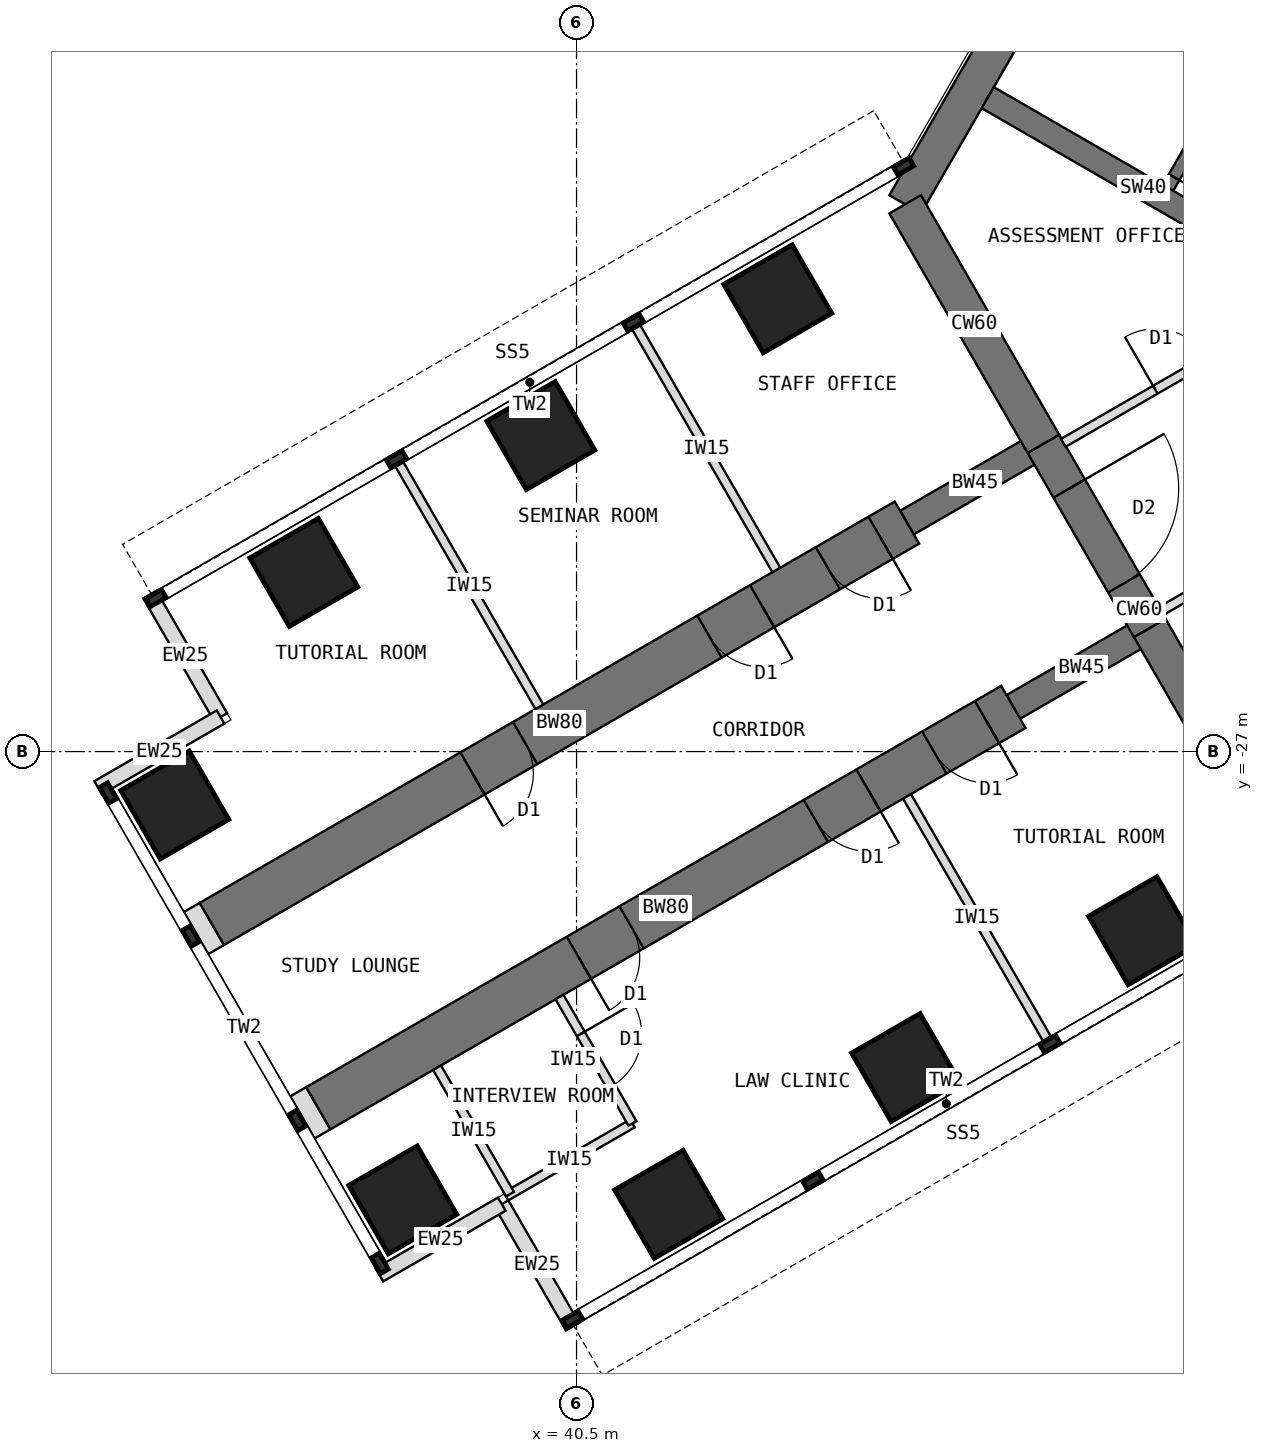
"""IFC4 building model, lengths in metres.
Left out: names, types, materials, properties, quantities, classifications, styles, units other than length and angle.
Written with IfcOpenShell. Run it as: python <this file> out.ifc"""

import sys

from ifc_helpers import new_model, si_unit, direction, frame, frame_2d, origin, origin_2d, place, context, subcontext, project, spatial, rectangle, extrude, element, fill, save


model = new_model("IFC4")
c1 = context("Model", 3, precision=1e-05, world=origin(), true_north=direction((0.0, 1.0)))
c2 = subcontext(c1, "Body", "Model", "MODEL_VIEW")
j1 = project(units=[si_unit("LENGTHUNIT", "METRE"), si_unit("PLANEANGLEUNIT", "RADIAN")], contexts=[c1])
p1 = place(None, origin())
s1 = spatial("IfcSite", under=j1, at=p1, CompositionType="ELEMENT")
p2 = place(p1, origin())
s2 = spatial("IfcBuilding", under=s1, at=p2, CompositionType="ELEMENT")
p3 = place(p2, frame((0.0, 0.0, 125.5)))
s3 = spatial("IfcBuildingStorey", under=s2, at=p3, CompositionType="ELEMENT", Elevation=125.5)
p4 = place(p3, frame((52.202, -7.092, 0.0), z_axis=(0.0, 0.0, 1.0), x_axis=(-0.500005998175, -0.866021940709, 0.0)))
e1 = element("IfcWall", 1, at=p4, inside=s3, PredefinedType="SHEAR", context=c2, shape_type="SweptSolid", body=[
    extrude(rectangle(XDim=12.596, YDim=0.6, at=frame_2d((6.298, 0.0))), origin(), (0.0, 0.0, 1.0), 4.0),
])
p5 = place(p3, frame((45.904, -18.0, 0.0), z_axis=(0.0, 0.0, 1.0), x_axis=(0.500024481964, -0.866011268655, 0.0)))
e2 = element("IfcWall", 2, at=p5, inside=s3, PredefinedType="SHEAR", context=c2, shape_type="SweptSolid", body=[
    extrude(rectangle(XDim=4.548, YDim=0.6, at=frame_2d((2.274, 0.0))), origin(), (0.0, 0.0, 1.0), 4.0),
])
p6 = place(p3, frame((48.178, -21.939, 0.0), z_axis=(0.0, 0.0, 1.0), x_axis=(0.500010275428, -0.866019471182, 0.0)))
e3 = element("IfcWall", 3, at=p6, inside=s3, PredefinedType="SHEAR", context=c2, shape_type="SweptSolid", body=[
    extrude(rectangle(XDim=3.5, YDim=0.6, at=frame_2d((1.75, 0.0))), origin(), (0.0, 0.0, 1.0), 4.0),
])
p7 = place(p6, frame((0.85, 0.0, 0.0)))
e4 = element("IfcOpeningElement", 4, at=p7, cuts=e3, PredefinedType="OPENING", context=c2, shape_type="SweptSolid", body=[
    extrude(rectangle(XDim=1.8, YDim=2.1, at=frame_2d((0.9, 1.05))), frame((0.0, 0.31, 0.0), z_axis=(0.0, -1.0, 0.0), x_axis=(1.0, 0.0, 0.0)), (0.0, 0.0, 1.0), 0.62),
])
p8 = place(p3, frame((49.928, -24.97, 0.0), z_axis=(0.0, 0.0, 1.0), x_axis=(0.499984222037, -0.866034513004, 0.0)))
e5 = element("IfcWall", 5, at=p8, inside=s3, PredefinedType="SHEAR", context=c2, shape_type="SweptSolid", body=[
    extrude(rectangle(XDim=4.548, YDim=0.6, at=frame_2d((2.274, 0.0))), origin(), (0.0, 0.0, 1.0), 4.0),
])
p9 = place(p3, frame((49.928, -24.97, 0.0), z_axis=(0.0, 0.0, 1.0), x_axis=(-0.866031863473, -0.499988811324, 0.0)))
e6 = element("IfcWall", 6, at=p9, inside=s3, PredefinedType="SHEAR", context=c2, shape_type="SweptSolid", body=[
    extrude(rectangle(XDim=2.592, YDim=0.45, at=frame_2d((1.296, 0.0))), origin(), (0.0, 0.0, 1.0), 4.0),
])
p10 = place(p3, frame((47.684, -26.266, 0.0), z_axis=(0.0, 0.0, 1.0), x_axis=(-0.866027579429, -0.499996231654, 0.0)))
e7 = element("IfcWall", 7, at=p10, inside=s3, PredefinedType="SHEAR", context=c2, shape_type="SweptSolid", body=[
    extrude(rectangle(XDim=13.2, YDim=0.8, at=frame_2d((6.6, 0.0))), origin(), (0.0, 0.0, 1.0), 4.0),
])
p11 = place(p10, frame((0.5, 0.0, 0.0)))
e8 = element("IfcOpeningElement", 8, at=p11, cuts=e7, PredefinedType="OPENING", context=c2, shape_type="SweptSolid", body=[
    extrude(rectangle(XDim=1.0, YDim=2.1, at=frame_2d((0.5, 1.05))), frame((0.0, 0.41, 0.0), z_axis=(0.0, -1.0, 0.0), x_axis=(1.0, 0.0, 0.0)), (0.0, 0.0, 1.0), 0.82),
])
p12 = place(p10, frame((2.75, 0.0, 0.0)))
e9 = element("IfcOpeningElement", 9, at=p12, cuts=e7, PredefinedType="OPENING", context=c2, shape_type="SweptSolid", body=[
    extrude(rectangle(XDim=1.0, YDim=2.1, at=frame_2d((0.5, 1.05))), frame((0.0, 0.41, 0.0), z_axis=(0.0, -1.0, 0.0), x_axis=(1.0, 0.0, 0.0)), (0.0, 0.0, 1.0), 0.82),
])
p13 = place(p10, frame((7.25, 0.0, 0.0)))
e10 = element("IfcOpeningElement", 10, at=p13, cuts=e7, PredefinedType="OPENING", context=c2, shape_type="SweptSolid", body=[
    extrude(rectangle(XDim=1.0, YDim=2.1, at=frame_2d((0.5, 1.05))), frame((0.0, 0.41, 0.0), z_axis=(0.0, -1.0, 0.0), x_axis=(1.0, 0.0, 0.0)), (0.0, 0.0, 1.0), 0.82),
])
p14 = place(p3, frame((48.178, -21.939, 0.0), z_axis=(0.0, 0.0, 1.0), x_axis=(-0.866072649678, -0.499918158782, 0.0)))
e11 = element("IfcWall", 11, at=p14, inside=s3, PredefinedType="SHEAR", context=c2, shape_type="SweptSolid", body=[
    extrude(rectangle(XDim=2.592, YDim=0.45, at=frame_2d((1.296, 0.0))), origin(), (0.0, 0.0, 1.0), 4.0),
])
p15 = place(p3, frame((45.934, -23.234, 0.0), z_axis=(0.0, 0.0, 1.0), x_axis=(-0.866019570528, -0.500010103361, 0.0)))
e12 = element("IfcWall", 12, at=p15, inside=s3, PredefinedType="SHEAR", context=c2, shape_type="SweptSolid", body=[
    extrude(rectangle(XDim=13.2, YDim=0.8, at=frame_2d((6.6, 0.0))), origin(), (0.0, 0.0, 1.0), 4.0),
])
p16 = place(p15, frame((0.5, 0.0, 0.0)))
e13 = element("IfcOpeningElement", 13, at=p16, cuts=e12, PredefinedType="OPENING", context=c2, shape_type="SweptSolid", body=[
    extrude(rectangle(XDim=1.0, YDim=2.1, at=frame_2d((0.5, 1.05))), frame((0.0, 0.41, 0.0), z_axis=(0.0, -1.0, 0.0), x_axis=(1.0, 0.0, 0.0)), (0.0, 0.0, 1.0), 0.82),
])
p17 = place(p15, frame((2.75, 0.0, 0.0)))
e14 = element("IfcOpeningElement", 14, at=p17, cuts=e12, PredefinedType="OPENING", context=c2, shape_type="SweptSolid", body=[
    extrude(rectangle(XDim=1.0, YDim=2.1, at=frame_2d((0.5, 1.05))), frame((0.0, 0.41, 0.0), z_axis=(0.0, -1.0, 0.0), x_axis=(1.0, 0.0, 0.0)), (0.0, 0.0, 1.0), 0.82),
])
p18 = place(p15, frame((7.25, 0.0, 0.0)))
e15 = element("IfcOpeningElement", 15, at=p18, cuts=e12, PredefinedType="OPENING", context=c2, shape_type="SweptSolid", body=[
    extrude(rectangle(XDim=1.0, YDim=2.1, at=frame_2d((0.5, 1.05))), frame((0.0, 0.41, 0.0), z_axis=(0.0, -1.0, 0.0), x_axis=(1.0, 0.0, 0.0)), (0.0, 0.0, 1.0), 0.82),
])
for number, where, z_axis, x_axis in (
    (16, (49.809, -29.946, 0.0), (0.0, 0.0, 1.0), (0.866, 0.5, 0.0)),
    (17, (43.809, -19.554, 0.0), (0.0, 0.0, 1.0), (0.866, 0.5, 0.0)),
    (18, (45.912, -32.196, 0.0), (0.0, 0.0, 1.0), (0.866, 0.5, 0.0)),
    (19, (39.912, -21.804, 0.0), (0.0, 0.0, 1.0), (0.866, 0.5, 0.0)),
    (20, (42.014, -34.446, 0.0), (0.0, 0.0, 1.0), (0.866, 0.5, 0.0)),
    (21, (36.014, -24.054, 0.0), (0.0, 0.0, 1.0), (0.866, 0.5, 0.0)),
    (22, (37.642, -34.373, 0.0), (0.0, 0.0, 1.0), (0.866, 0.5, 0.0)),
    (23, (33.892, -27.877, 0.0), (0.0, 0.0, 1.0), (0.866, 0.5, 0.0)),
):
    element("IfcColumn", number, at=place(p3, frame(where, z_axis=z_axis, x_axis=x_axis)), inside=s3, PredefinedType="COLUMN", context=c2, shape_type="SweptSolid", body=[
        extrude(rectangle(XDim=1.3, YDim=1.3, at=origin_2d()), origin(), (0.0, 0.0, 1.0), 4.0),
    ])
for number, where, z_axis, x_axis in (
    (24, (40.433, -36.456, 0.0), (0.0, 0.0, 1.0), (-0.5, 0.866, 0.0)),
    (25, (39.27, -34.443, 0.0), (0.0, 0.0, 1.0), (-0.866, -0.5, 0.0)),
    (26, (33.483, -24.419, 0.0), (0.0, 0.0, 1.0), (0.5, -0.866, 0.0)),
    (27, (34.645, -26.432, 0.0), (0.0, 0.0, 1.0), (-0.866, -0.5, 0.0)),
):
    element("IfcWall", number, at=place(p3, frame(where, z_axis=z_axis, x_axis=x_axis)), inside=s3, PredefinedType="STANDARD", context=c2, shape_type="SweptSolid", body=[
        extrude(rectangle(XDim=2.325, YDim=0.25, at=frame_2d((1.163, 0.0))), origin(), (0.0, 0.0, 1.0), 3.8),
    ])
p19 = place(p3, frame((36.252, -32.865, 0.0), z_axis=(0.0, 0.0, 1.0), x_axis=(-0.865778900179, -0.500426713919, 0.0)))
e28 = element("IfcWall", 28, at=p19, inside=s3, PredefinedType="PARTITIONING", context=c2, shape_type="SweptSolid", body=[
    extrude(rectangle(XDim=0.3, YDim=0.8, at=frame_2d((0.15, 0.0))), origin(), (0.0, 0.0, 1.0), 3.8),
])
p20 = place(p3, frame((34.502, -29.834, 0.0), z_axis=(0.0, 0.0, 1.0), x_axis=(-0.866131372301, -0.499816412211, 0.0)))
e29 = element("IfcWall", 29, at=p20, inside=s3, PredefinedType="PARTITIONING", context=c2, shape_type="SweptSolid", body=[
    extrude(rectangle(XDim=0.3, YDim=0.8, at=frame_2d((0.15, 0.0))), origin(), (0.0, 0.0, 1.0), 3.8),
])
p21 = place(p3, frame((54.178, -10.886, 0.0), z_axis=(0.0, 0.0, 1.0), x_axis=(-0.49999894854, -0.866026010844, 0.0)))
e30 = element("IfcWall", 30, at=p21, inside=s3, PredefinedType="SHEAR", context=c2, shape_type="SweptSolid", body=[
    extrude(rectangle(XDim=8.0, YDim=0.2, at=frame_2d((4.0, 0.0))), origin(), (0.0, 0.0, 1.0), 4.0),
])
p22 = place(p21, frame((6.8, 0.0, 0.0)))
e31 = element("IfcOpeningElement", 31, at=p22, cuts=e30, PredefinedType="OPENING", context=c2, shape_type="SweptSolid", body=[
    extrude(rectangle(XDim=0.9, YDim=2.1, at=frame_2d((0.45, 1.05))), frame((0.0, 0.11, 0.0), z_axis=(0.0, -1.0, 0.0), x_axis=(1.0, 0.0, 0.0)), (0.0, 0.0, 1.0), 0.22),
])
p23 = place(p3, frame((52.38, -19.201, 0.0), z_axis=(0.0, 0.0, 1.0), x_axis=(-0.866027317282, 0.49999668571, 0.0)))
e32 = element("IfcWall", 32, at=p23, inside=s3, PredefinedType="SHEAR", context=c2, shape_type="SweptSolid", body=[
    extrude(rectangle(XDim=5.908, YDim=0.4, at=frame_2d((2.954, 0.0))), origin(), (0.0, 0.0, 1.0), 4.0),
])
p24 = place(p3, frame((45.935, -27.737, 0.0), z_axis=(0.0, 0.0, 1.0), x_axis=(0.500014953309, -0.866016770315, 0.0)))
e33 = element("IfcWall", 33, at=p24, inside=s3, PredefinedType="PARTITIONING", context=c2, shape_type="SweptSolid", body=[
    extrude(rectangle(XDim=4.6, YDim=0.15, at=frame_2d((2.3, 0.0))), origin(), (0.0, 0.0, 1.0), 3.8),
])
p25 = place(p3, frame((41.419, -33.115, 0.0), z_axis=(0.0, 0.0, 1.0), x_axis=(-0.866050077142, -0.499957262057, 0.0)))
e34 = element("IfcWall", 34, at=p25, inside=s3, PredefinedType="PARTITIONING", context=c2, shape_type="SweptSolid", body=[
    extrude(rectangle(XDim=2.4, YDim=0.15, at=frame_2d((1.2, 0.0))), origin(), (0.0, 0.0, 1.0), 3.8),
])
p26 = place(p3, frame((40.219, -31.037, 0.0), z_axis=(0.0, 0.0, 1.0), x_axis=(0.500033551112, -0.866006032174, 0.0)))
e35 = element("IfcWall", 35, at=p26, inside=s3, PredefinedType="PARTITIONING", context=c2, shape_type="SweptSolid", body=[
    extrude(rectangle(XDim=2.4, YDim=0.15, at=frame_2d((1.2, 0.0))), origin(), (0.0, 0.0, 1.0), 3.8),
])
p27 = place(p26, frame((0.7, 0.0, 0.0)))
e36 = element("IfcOpeningElement", 36, at=p27, cuts=e35, PredefinedType="OPENING", context=c2, shape_type="SweptSolid", body=[
    extrude(rectangle(XDim=1.0, YDim=2.1, at=frame_2d((0.5, 1.05))), frame((0.0, 0.085, 0.0), z_axis=(0.0, -1.0, 0.0), x_axis=(1.0, 0.0, 0.0)), (0.0, 0.0, 1.0), 0.17),
])
p28 = place(p3, frame((38.206, -32.199, 0.0), z_axis=(0.0, 0.0, 1.0), x_axis=(0.500001309137, -0.866024647952, 0.0)))
e37 = element("IfcWall", 37, at=p28, inside=s3, PredefinedType="PARTITIONING", context=c2, shape_type="SweptSolid", body=[
    extrude(rectangle(XDim=2.4, YDim=0.15, at=frame_2d((1.2, 0.0))), origin(), (0.0, 0.0, 1.0), 3.8),
])
for number, where, z_axis, x_axis in (
    (38, (43.785, -24.013, 0.0), (0.0, 0.0, 1.0), (-0.5, 0.866, 0.0)),
    (39, (39.888, -26.263, 0.0), (0.0, 0.0, 1.0), (-0.5, 0.866, 0.0)),
):
    element("IfcWall", number, at=place(p3, frame(where, z_axis=z_axis, x_axis=x_axis)), inside=s3, PredefinedType="PARTITIONING", context=c2, shape_type="SweptSolid", body=[
        extrude(rectangle(XDim=4.6, YDim=0.15, at=frame_2d((2.3, 0.0))), origin(), (0.0, 0.0, 1.0), 3.8),
    ])
p29 = place(p3, frame((54.017, -22.436, 0.0), z_axis=(0.0, 0.0, 1.0), x_axis=(-0.86602002524, -0.500009315796, 0.0)))
e40 = element("IfcWall", 40, at=p29, inside=s3, PredefinedType="PARTITIONING", context=c2, shape_type="SweptSolid", body=[
    extrude(rectangle(XDim=4.519, YDim=0.15, at=frame_2d((2.259, 0.0))), origin(), (0.0, 0.0, 1.0), 3.8),
])
p30 = place(p29, frame((1.769, 0.0, 0.0)))
e41 = element("IfcOpeningElement", 41, at=p30, cuts=e40, PredefinedType="OPENING", context=c2, shape_type="SweptSolid", body=[
    extrude(rectangle(XDim=1.0, YDim=2.1, at=frame_2d((0.5, 1.05))), frame((0.0, 0.085, 0.0), z_axis=(0.0, -1.0, 0.0), x_axis=(1.0, 0.0, 0.0)), (0.0, 0.0, 1.0), 0.17),
])
p31 = place(p3, frame((48.504, -21.924, 0.0), z_axis=(0.0, 0.0, 1.0), x_axis=(0.866006515865, 0.500032713409, 0.0)))
e42 = element("IfcWall", 42, at=p31, inside=s3, PredefinedType="PARTITIONING", context=c2, shape_type="SweptSolid", body=[
    extrude(rectangle(XDim=4.518, YDim=0.15, at=frame_2d((2.259, 0.0))), origin(), (0.0, 0.0, 1.0), 3.8),
])
p32 = place(p31, frame((1.749, 0.0, 0.0)))
e43 = element("IfcOpeningElement", 43, at=p32, cuts=e42, PredefinedType="OPENING", context=c2, shape_type="SweptSolid", body=[
    extrude(rectangle(XDim=1.0, YDim=2.1, at=frame_2d((0.5, 1.05))), frame((0.0, 0.085, 0.0), z_axis=(0.0, -1.0, 0.0), x_axis=(1.0, 0.0, 0.0)), (0.0, 0.0, 1.0), 0.17),
])
p33 = place(p22, origin())
e44 = element("IfcDoor", 44, at=p33, inside=s3, OperationType="SINGLE_SWING_RIGHT", PredefinedType="DOOR", context=c2, shape_type="SweptSolid", body=[
    extrude(rectangle(XDim=0.9, YDim=2.1, at=frame_2d((0.45, 1.05))), frame((0.0, 0.025, 0.0), z_axis=(0.0, -1.0, 0.0), x_axis=(1.0, 0.0, 0.0)), (0.0, 0.0, 1.0), 0.05),
])
fill(e31, e44)
p34 = place(p7, origin())
e45 = element("IfcDoor", 45, at=p34, inside=s3, OperationType="DOUBLE_DOOR_DOUBLE_SWING", PredefinedType="DOOR", context=c2, shape_type="SweptSolid", body=[
    extrude(rectangle(XDim=1.72, YDim=2.06, at=frame_2d((0.9, 1.03))), frame((0.0, 0.025, 0.0), z_axis=(0.0, -1.0, 0.0), x_axis=(1.0, 0.0, 0.0)), (0.0, 0.0, 1.0), 0.05),
    extrude(rectangle(XDim=0.04, YDim=2.1, at=frame_2d((0.02, 1.05))), frame((0.0, 0.3, 0.0), z_axis=(0.0, -1.0, 0.0), x_axis=(1.0, 0.0, 0.0)), (0.0, 0.0, 1.0), 0.6),
    extrude(rectangle(XDim=0.04, YDim=2.1, at=frame_2d((1.78, 1.05))), frame((0.0, 0.3, 0.0), z_axis=(0.0, -1.0, 0.0), x_axis=(1.0, 0.0, 0.0)), (0.0, 0.0, 1.0), 0.6),
    extrude(rectangle(XDim=1.72, YDim=0.04, at=frame_2d((0.9, 2.08))), frame((0.0, 0.3, 0.0), z_axis=(0.0, -1.0, 0.0), x_axis=(1.0, 0.0, 0.0)), (0.0, 0.0, 1.0), 0.6),
])
fill(e4, e45)
p35 = place(p27, origin())
e46 = element("IfcDoor", 46, at=p35, inside=s3, OperationType="SINGLE_SWING_LEFT", PredefinedType="DOOR", context=c2, shape_type="SweptSolid", body=[
    extrude(rectangle(XDim=1.0, YDim=2.1, at=frame_2d((0.5, 1.05))), frame((0.0, 0.025, 0.0), z_axis=(0.0, -1.0, 0.0), x_axis=(1.0, 0.0, 0.0)), (0.0, 0.0, 1.0), 0.05),
])
fill(e36, e46)
p36 = place(p32, origin())
e47 = element("IfcDoor", 47, at=p36, inside=s3, OperationType="SINGLE_SWING_LEFT", PredefinedType="DOOR", context=c2, shape_type="SweptSolid", body=[
    extrude(rectangle(XDim=1.0, YDim=2.1, at=frame_2d((0.5, 1.05))), frame((0.0, 0.025, 0.0), z_axis=(0.0, -1.0, 0.0), x_axis=(1.0, 0.0, 0.0)), (0.0, 0.0, 1.0), 0.05),
])
fill(e43, e47)
p37 = place(p11, origin())
e48 = element("IfcDoor", 48, at=p37, inside=s3, OperationType="SINGLE_SWING_LEFT", PredefinedType="DOOR", context=c2, shape_type="SweptSolid", body=[
    extrude(rectangle(XDim=0.92, YDim=2.06, at=frame_2d((0.5, 1.03))), frame((0.0, 0.025, 0.0), z_axis=(0.0, -1.0, 0.0), x_axis=(1.0, 0.0, 0.0)), (0.0, 0.0, 1.0), 0.05),
    extrude(rectangle(XDim=0.04, YDim=2.1, at=frame_2d((0.02, 1.05))), frame((0.0, 0.4, 0.0), z_axis=(0.0, -1.0, 0.0), x_axis=(1.0, 0.0, 0.0)), (0.0, 0.0, 1.0), 0.8),
    extrude(rectangle(XDim=0.04, YDim=2.1, at=frame_2d((0.98, 1.05))), frame((0.0, 0.4, 0.0), z_axis=(0.0, -1.0, 0.0), x_axis=(1.0, 0.0, 0.0)), (0.0, 0.0, 1.0), 0.8),
    extrude(rectangle(XDim=0.92, YDim=0.04, at=frame_2d((0.5, 2.08))), frame((0.0, 0.4, 0.0), z_axis=(0.0, -1.0, 0.0), x_axis=(1.0, 0.0, 0.0)), (0.0, 0.0, 1.0), 0.8),
])
fill(e8, e48)
p38 = place(p12, origin())
e49 = element("IfcDoor", 49, at=p38, inside=s3, OperationType="SINGLE_SWING_LEFT", PredefinedType="DOOR", context=c2, shape_type="SweptSolid", body=[
    extrude(rectangle(XDim=0.92, YDim=2.06, at=frame_2d((0.5, 1.03))), frame((0.0, 0.025, 0.0), z_axis=(0.0, -1.0, 0.0), x_axis=(1.0, 0.0, 0.0)), (0.0, 0.0, 1.0), 0.05),
    extrude(rectangle(XDim=0.04, YDim=2.1, at=frame_2d((0.02, 1.05))), frame((0.0, 0.4, 0.0), z_axis=(0.0, -1.0, 0.0), x_axis=(1.0, 0.0, 0.0)), (0.0, 0.0, 1.0), 0.8),
    extrude(rectangle(XDim=0.04, YDim=2.1, at=frame_2d((0.98, 1.05))), frame((0.0, 0.4, 0.0), z_axis=(0.0, -1.0, 0.0), x_axis=(1.0, 0.0, 0.0)), (0.0, 0.0, 1.0), 0.8),
    extrude(rectangle(XDim=0.92, YDim=0.04, at=frame_2d((0.5, 2.08))), frame((0.0, 0.4, 0.0), z_axis=(0.0, -1.0, 0.0), x_axis=(1.0, 0.0, 0.0)), (0.0, 0.0, 1.0), 0.8),
])
fill(e9, e49)
p39 = place(p13, origin())
e50 = element("IfcDoor", 50, at=p39, inside=s3, OperationType="SINGLE_SWING_RIGHT", PredefinedType="DOOR", context=c2, shape_type="SweptSolid", body=[
    extrude(rectangle(XDim=0.92, YDim=2.06, at=frame_2d((0.5, 1.03))), frame((0.0, 0.025, 0.0), z_axis=(0.0, -1.0, 0.0), x_axis=(1.0, 0.0, 0.0)), (0.0, 0.0, 1.0), 0.05),
    extrude(rectangle(XDim=0.04, YDim=2.1, at=frame_2d((0.02, 1.05))), frame((0.0, 0.4, 0.0), z_axis=(0.0, -1.0, 0.0), x_axis=(1.0, 0.0, 0.0)), (0.0, 0.0, 1.0), 0.8),
    extrude(rectangle(XDim=0.04, YDim=2.1, at=frame_2d((0.98, 1.05))), frame((0.0, 0.4, 0.0), z_axis=(0.0, -1.0, 0.0), x_axis=(1.0, 0.0, 0.0)), (0.0, 0.0, 1.0), 0.8),
    extrude(rectangle(XDim=0.92, YDim=0.04, at=frame_2d((0.5, 2.08))), frame((0.0, 0.4, 0.0), z_axis=(0.0, -1.0, 0.0), x_axis=(1.0, 0.0, 0.0)), (0.0, 0.0, 1.0), 0.8),
])
fill(e10, e50)
p40 = place(p16, origin())
e51 = element("IfcDoor", 51, at=p40, inside=s3, OperationType="SINGLE_SWING_LEFT", PredefinedType="DOOR", context=c2, shape_type="SweptSolid", body=[
    extrude(rectangle(XDim=0.92, YDim=2.06, at=frame_2d((0.5, 1.03))), frame((0.0, 0.025, 0.0), z_axis=(0.0, -1.0, 0.0), x_axis=(1.0, 0.0, 0.0)), (0.0, 0.0, 1.0), 0.05),
    extrude(rectangle(XDim=0.04, YDim=2.1, at=frame_2d((0.02, 1.05))), frame((0.0, 0.4, 0.0), z_axis=(0.0, -1.0, 0.0), x_axis=(1.0, 0.0, 0.0)), (0.0, 0.0, 1.0), 0.8),
    extrude(rectangle(XDim=0.04, YDim=2.1, at=frame_2d((0.98, 1.05))), frame((0.0, 0.4, 0.0), z_axis=(0.0, -1.0, 0.0), x_axis=(1.0, 0.0, 0.0)), (0.0, 0.0, 1.0), 0.8),
    extrude(rectangle(XDim=0.92, YDim=0.04, at=frame_2d((0.5, 2.08))), frame((0.0, 0.4, 0.0), z_axis=(0.0, -1.0, 0.0), x_axis=(1.0, 0.0, 0.0)), (0.0, 0.0, 1.0), 0.8),
])
fill(e13, e51)
p41 = place(p17, origin())
e52 = element("IfcDoor", 52, at=p41, inside=s3, OperationType="SINGLE_SWING_LEFT", PredefinedType="DOOR", context=c2, shape_type="SweptSolid", body=[
    extrude(rectangle(XDim=0.92, YDim=2.06, at=frame_2d((0.5, 1.03))), frame((0.0, 0.025, 0.0), z_axis=(0.0, -1.0, 0.0), x_axis=(1.0, 0.0, 0.0)), (0.0, 0.0, 1.0), 0.05),
    extrude(rectangle(XDim=0.04, YDim=2.1, at=frame_2d((0.02, 1.05))), frame((0.0, 0.4, 0.0), z_axis=(0.0, -1.0, 0.0), x_axis=(1.0, 0.0, 0.0)), (0.0, 0.0, 1.0), 0.8),
    extrude(rectangle(XDim=0.04, YDim=2.1, at=frame_2d((0.98, 1.05))), frame((0.0, 0.4, 0.0), z_axis=(0.0, -1.0, 0.0), x_axis=(1.0, 0.0, 0.0)), (0.0, 0.0, 1.0), 0.8),
    extrude(rectangle(XDim=0.92, YDim=0.04, at=frame_2d((0.5, 2.08))), frame((0.0, 0.4, 0.0), z_axis=(0.0, -1.0, 0.0), x_axis=(1.0, 0.0, 0.0)), (0.0, 0.0, 1.0), 0.8),
])
fill(e14, e52)
p42 = place(p18, origin())
e53 = element("IfcDoor", 53, at=p42, inside=s3, OperationType="SINGLE_SWING_RIGHT", PredefinedType="DOOR", context=c2, shape_type="SweptSolid", body=[
    extrude(rectangle(XDim=0.92, YDim=2.06, at=frame_2d((0.5, 1.03))), frame((0.0, 0.025, 0.0), z_axis=(0.0, -1.0, 0.0), x_axis=(1.0, 0.0, 0.0)), (0.0, 0.0, 1.0), 0.05),
    extrude(rectangle(XDim=0.04, YDim=2.1, at=frame_2d((0.02, 1.05))), frame((0.0, 0.4, 0.0), z_axis=(0.0, -1.0, 0.0), x_axis=(1.0, 0.0, 0.0)), (0.0, 0.0, 1.0), 0.8),
    extrude(rectangle(XDim=0.04, YDim=2.1, at=frame_2d((0.98, 1.05))), frame((0.0, 0.4, 0.0), z_axis=(0.0, -1.0, 0.0), x_axis=(1.0, 0.0, 0.0)), (0.0, 0.0, 1.0), 0.8),
    extrude(rectangle(XDim=0.92, YDim=0.04, at=frame_2d((0.5, 2.08))), frame((0.0, 0.4, 0.0), z_axis=(0.0, -1.0, 0.0), x_axis=(1.0, 0.0, 0.0)), (0.0, 0.0, 1.0), 0.8),
])
fill(e15, e53)
save(model, sys.argv[1])
